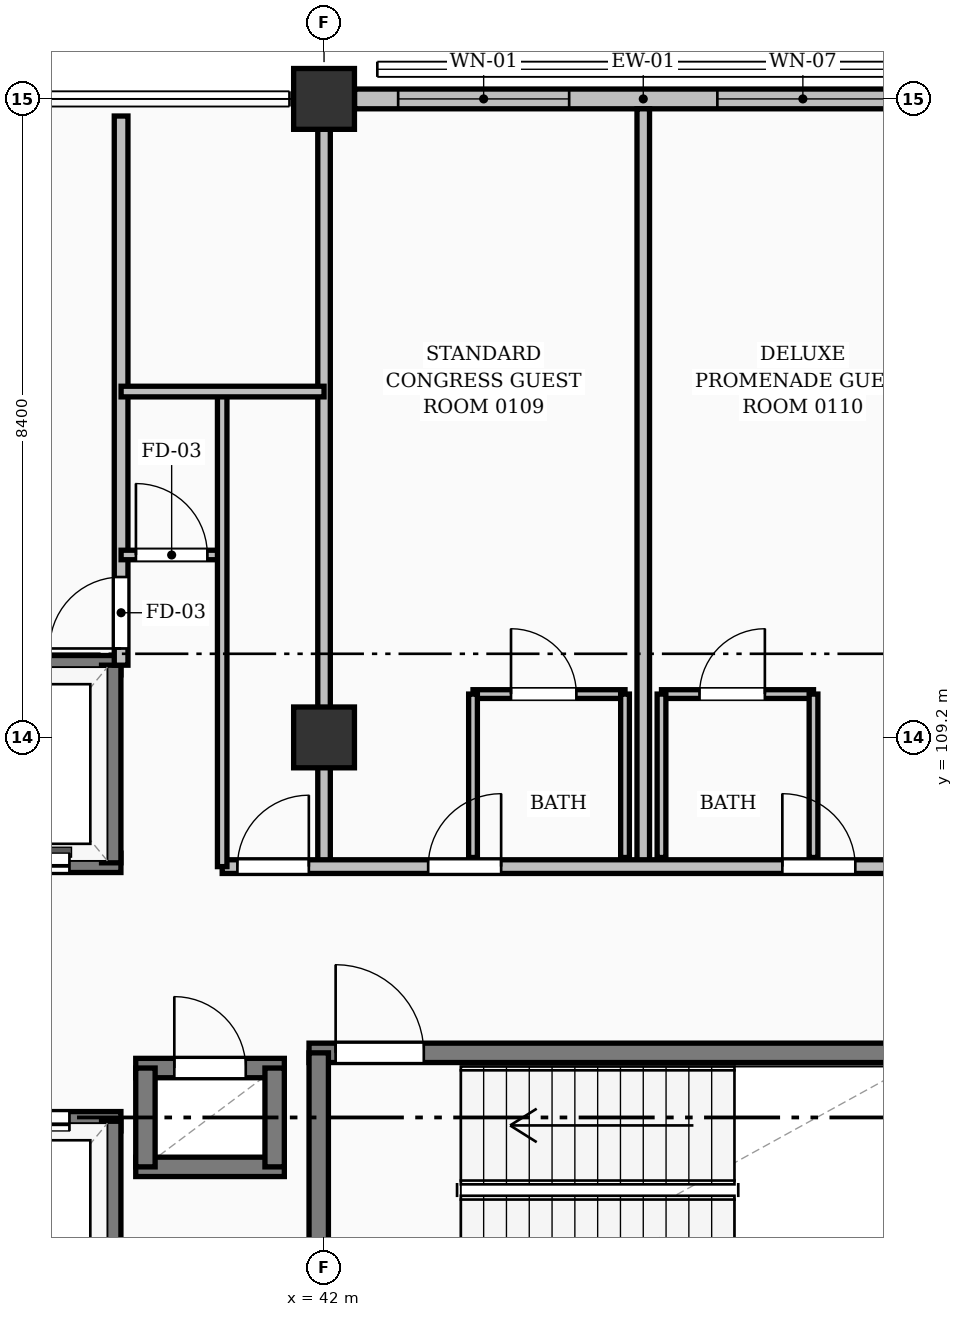
"""IFC4 building model, lengths in metres.
Left out: names, types, materials, properties, quantities, classifications, styles, units other than length and angle.
Written with IfcOpenShell. Run it as: python <this file> out.ifc"""

import sys

from ifc_helpers import new_model, si_unit, direction, frame, frame_2d, origin, origin_2d, place, context, subcontext, project, spatial, rectangle, extrude, element, fill, save


model = new_model("IFC4")
c1 = context("Model", 3, precision=1e-05, world=origin(), true_north=direction((0.0, 1.0)))
c2 = subcontext(c1, "Body", "Model", "MODEL_VIEW")
j1 = project(units=[si_unit("LENGTHUNIT", "METRE"), si_unit("PLANEANGLEUNIT", "RADIAN")], contexts=[c1])
p1 = place(None, origin())
s1 = spatial("IfcSite", under=j1, at=p1, CompositionType="ELEMENT")
p2 = place(p1, origin())
s2 = spatial("IfcBuilding", under=s1, at=p2, CompositionType="ELEMENT")
p3 = place(p2, frame((0.0, 0.0, 3.92)))
s3 = spatial("IfcBuildingStorey", under=s2, at=p3, CompositionType="ELEMENT", Elevation=3.92)
for number, where, z_axis, x_axis in (
    (1, (42.0, 109.2, 0.0), (0.0, 0.0, 1.0), (1.0, 0.0, 0.0)),
    (2, (42.0, 117.6, 0.0), (0.0, 0.0, 1.0), (1.0, 0.0, 0.0)),
):
    element("IfcColumn", number, at=place(p3, frame(where, z_axis=z_axis, x_axis=x_axis)), inside=s3, PredefinedType="COLUMN", context=c2, shape_type="SweptSolid", body=[
        extrude(rectangle(XDim=0.8, YDim=0.8, at=origin_2d()), origin(), (0.0, 0.0, 1.0), 3.64),
    ])
p4 = place(p3, frame((42.401, 117.6, 0.0), z_axis=(0.0, 0.0, 1.0), x_axis=(1.0, 0.0, 0.0)))
e3 = element("IfcWall", 3, at=p4, inside=s3, PredefinedType="SOLIDWALL", context=c2, shape_type="SweptSolid", body=[
    extrude(rectangle(XDim=7.598, YDim=0.26, at=frame_2d((3.799, 0.0))), origin(), (0.0, 0.0, 1.0), 2.445),
])
p5 = place(p4, frame((0.574, 0.0, 0.25)))
e4 = element("IfcOpeningElement", 4, at=p5, cuts=e3, PredefinedType="OPENING", context=c2, shape_type="SweptSolid", body=[
    extrude(rectangle(XDim=2.25, YDim=1.85, at=frame_2d((1.125, 0.925))), frame((0.0, 0.14, 0.0), z_axis=(0.0, -1.0, 0.0), x_axis=(1.0, 0.0, 0.0)), (0.0, 0.0, 1.0), 0.28),
])
p6 = place(p4, frame((4.774, 0.0, 0.25)))
e5 = element("IfcOpeningElement", 5, at=p6, cuts=e3, PredefinedType="OPENING", context=c2, shape_type="SweptSolid", body=[
    extrude(rectangle(XDim=2.25, YDim=1.95, at=frame_2d((1.125, 0.975))), frame((0.0, 0.14, 0.0), z_axis=(0.0, -1.0, 0.0), x_axis=(1.0, 0.0, 0.0)), (0.0, 0.0, 1.0), 0.28),
])
p7 = place(p3, frame((41.802, 105.05, 0.0), z_axis=(0.0, 0.0, 1.0), x_axis=(1.0, 0.0, 0.0)))
e6 = element("IfcWall", 6, at=p7, inside=s3, PredefinedType="SOLIDWALL", context=c2, shape_type="SweptSolid", body=[
    extrude(rectangle(XDim=8.225, YDim=0.255, at=frame_2d((4.113, 0.0))), origin(), (0.0, 0.0, 1.0), 3.36),
])
p8 = place(p7, frame((0.35, 0.0, 0.0)))
e7 = element("IfcOpeningElement", 7, at=p8, cuts=e6, PredefinedType="OPENING", context=c2, shape_type="SweptSolid", body=[
    extrude(rectangle(XDim=1.16, YDim=2.15, at=frame_2d((0.58, 1.075))), frame((0.0, 0.137, 0.0), z_axis=(0.0, -1.0, 0.0), x_axis=(1.0, 0.0, 0.0)), (0.0, 0.0, 1.0), 0.275),
])
p9 = place(p3, frame((41.93, 101.42, 0.0), z_axis=(0.0, 0.0, 1.0), x_axis=(0.0, 1.0, 0.0)))
e8 = element("IfcWall", 8, at=p9, inside=s3, PredefinedType="SOLIDWALL", context=c2, shape_type="SweptSolid", body=[
    extrude(rectangle(XDim=3.63, YDim=0.255, at=frame_2d((1.815, 0.0))), origin(), (0.0, 0.0, 1.0), 3.36),
])
p10 = place(p3, frame((36.873, 107.55, 0.0), z_axis=(0.0, 0.0, 1.0), x_axis=(1.0, 0.0, 0.0)))
e9 = element("IfcWall", 9, at=p10, inside=s3, PredefinedType="SOLIDWALL", context=c2, shape_type="SweptSolid", body=[
    extrude(rectangle(XDim=2.455, YDim=0.255, at=frame_2d((1.228, 0.0))), origin(), (0.0, 0.0, 1.0), 3.36),
])
p11 = place(p10, frame((0.677, 0.0, 0.0)))
e10 = element("IfcOpeningElement", 10, at=p11, cuts=e9, PredefinedType="OPENING", context=c2, shape_type="SweptSolid", body=[
    extrude(rectangle(XDim=1.1, YDim=2.15, at=frame_2d((0.55, 1.075))), frame((0.0, 0.137, 0.0), z_axis=(0.0, -1.0, 0.0), x_axis=(1.0, 0.0, 0.0)), (0.0, 0.0, 1.0), 0.275),
])
p12 = place(p3, frame((36.873, 110.15, 0.0), z_axis=(0.0, 0.0, 1.0), x_axis=(1.0, 0.0, 0.0)))
e11 = element("IfcWall", 11, at=p12, inside=s3, PredefinedType="SOLIDWALL", context=c2, shape_type="SweptSolid", body=[
    extrude(rectangle(XDim=2.455, YDim=0.255, at=frame_2d((1.228, 0.0))), origin(), (0.0, 0.0, 1.0), 3.36),
])
p13 = place(p3, frame((39.2, 107.55, 0.0), z_axis=(0.0, 0.0, 1.0), x_axis=(0.0, 1.0, 0.0)))
e12 = element("IfcWall", 12, at=p13, inside=s3, PredefinedType="SOLIDWALL", context=c2, shape_type="SweptSolid", body=[
    extrude(rectangle(XDim=2.6, YDim=0.255, at=frame_2d((1.3, 0.0))), origin(), (0.0, 0.0, 1.0), 3.36),
])
p14 = place(p3, frame((36.873, 104.15, 0.0), z_axis=(0.0, 0.0, 1.0), x_axis=(1.0, 0.0, 0.0)))
e13 = element("IfcWall", 13, at=p14, inside=s3, PredefinedType="SOLIDWALL", context=c2, shape_type="SweptSolid", body=[
    extrude(rectangle(XDim=2.455, YDim=0.255, at=frame_2d((1.228, 0.0))), origin(), (0.0, 0.0, 1.0), 3.36),
])
p15 = place(p14, frame((0.677, 0.0, 0.0)))
e14 = element("IfcOpeningElement", 14, at=p15, cuts=e13, PredefinedType="OPENING", context=c2, shape_type="SweptSolid", body=[
    extrude(rectangle(XDim=1.1, YDim=2.15, at=frame_2d((0.55, 1.075))), frame((0.0, 0.137, 0.0), z_axis=(0.0, -1.0, 0.0), x_axis=(1.0, 0.0, 0.0)), (0.0, 0.0, 1.0), 0.275),
])
p16 = place(p3, frame((39.2, 101.55, 0.0), z_axis=(0.0, 0.0, 1.0), x_axis=(0.0, 1.0, 0.0)))
e15 = element("IfcWall", 15, at=p16, inside=s3, PredefinedType="SOLIDWALL", context=c2, shape_type="SweptSolid", body=[
    extrude(rectangle(XDim=2.6, YDim=0.255, at=frame_2d((1.3, 0.0))), origin(), (0.0, 0.0, 1.0), 3.36),
])
p17 = place(p3, frame((39.522, 103.55, 0.0), z_axis=(0.0, 0.0, 1.0), x_axis=(1.0, 0.0, 0.0)))
e16 = element("IfcWall", 16, at=p17, inside=s3, PredefinedType="SOLIDWALL", context=c2, shape_type="SweptSolid", body=[
    extrude(rectangle(XDim=1.955, YDim=0.255, at=frame_2d((0.978, 0.0))), origin(), (0.0, 0.0, 1.0), 3.36),
])
p18 = place(p3, frame((39.522, 104.85, 0.0), z_axis=(0.0, 0.0, 1.0), x_axis=(1.0, 0.0, 0.0)))
e17 = element("IfcWall", 17, at=p18, inside=s3, PredefinedType="SOLIDWALL", context=c2, shape_type="SweptSolid", body=[
    extrude(rectangle(XDim=1.955, YDim=0.255, at=frame_2d((0.978, 0.0))), origin(), (0.0, 0.0, 1.0), 3.36),
])
p19 = place(p18, frame((0.508, 0.0, 0.0)))
e18 = element("IfcOpeningElement", 18, at=p19, cuts=e17, PredefinedType="OPENING", context=c2, shape_type="SweptSolid", body=[
    extrude(rectangle(XDim=0.94, YDim=2.1, at=frame_2d((0.47, 1.05))), frame((0.0, 0.137, 0.0), z_axis=(0.0, -1.0, 0.0), x_axis=(1.0, 0.0, 0.0)), (0.0, 0.0, 1.0), 0.275),
])
for number, where, z_axis, x_axis in (
    (19, (39.65, 103.55, 0.0), (0.0, 0.0, 1.0), (0.0, 1.0, 0.0)),
    (20, (41.35, 103.55, 0.0), (0.0, 0.0, 1.0), (0.0, 1.0, 0.0)),
):
    element("IfcWall", number, at=place(p3, frame(where, z_axis=z_axis, x_axis=x_axis)), inside=s3, PredefinedType="SOLIDWALL", context=c2, shape_type="SweptSolid", body=[
        extrude(rectangle(XDim=1.3, YDim=0.255, at=frame_2d((0.65, 0.0))), origin(), (0.0, 0.0, 1.0), 3.36),
    ])
p20 = place(p3, frame((43.96, 109.77, 0.0), z_axis=(0.0, 0.0, 1.0), x_axis=(1.0, 0.0, 0.0)))
e21 = element("IfcWall", 21, at=p20, inside=s3, PredefinedType="PARTITIONING", context=c2, shape_type="SweptSolid", body=[
    extrude(rectangle(XDim=2.0, YDim=0.115, at=frame_2d((1.0, 0.0))), origin(), (0.0, 0.0, 1.0), 3.36),
])
p21 = place(p20, frame((0.5, 0.0, 0.0)))
e22 = element("IfcOpeningElement", 22, at=p21, cuts=e21, PredefinedType="OPENING", context=c2, shape_type="SweptSolid", body=[
    extrude(rectangle(XDim=0.86, YDim=2.05, at=frame_2d((0.43, 1.025))), frame((0.0, 0.067, 0.0), z_axis=(0.0, -1.0, 0.0), x_axis=(1.0, 0.0, 0.0)), (0.0, 0.0, 1.0), 0.135),
])
p22 = place(p3, frame((43.96, 107.62, 0.0), z_axis=(0.0, 0.0, 1.0), x_axis=(0.0, 1.0, 0.0)))
e23 = element("IfcWall", 23, at=p22, inside=s3, PredefinedType="PARTITIONING", context=c2, shape_type="SweptSolid", body=[
    extrude(rectangle(XDim=2.15, YDim=0.115, at=frame_2d((1.075, 0.0))), origin(), (0.0, 0.0, 1.0), 2.882),
])
p23 = place(p3, frame((45.96, 107.62, 0.0), z_axis=(0.0, 0.0, 1.0), x_axis=(0.0, 1.0, 0.0)))
e24 = element("IfcWall", 24, at=p23, inside=s3, PredefinedType="PARTITIONING", context=c2, shape_type="SweptSolid", body=[
    extrude(rectangle(XDim=2.15, YDim=0.115, at=frame_2d((1.075, 0.0))), origin(), (0.0, 0.0, 1.0), 3.36),
])
p24 = place(p3, frame((46.44, 109.77, 0.0), z_axis=(0.0, 0.0, 1.0), x_axis=(1.0, 0.0, 0.0)))
e25 = element("IfcWall", 25, at=p24, inside=s3, PredefinedType="PARTITIONING", context=c2, shape_type="SweptSolid", body=[
    extrude(rectangle(XDim=2.0, YDim=0.115, at=frame_2d((1.0, 0.0))), origin(), (0.0, 0.0, 1.0), 3.36),
])
p25 = place(p24, frame((0.5, 0.0, 0.0)))
e26 = element("IfcOpeningElement", 26, at=p25, cuts=e25, PredefinedType="OPENING", context=c2, shape_type="SweptSolid", body=[
    extrude(rectangle(XDim=0.86, YDim=2.05, at=frame_2d((0.43, 1.025))), frame((0.0, 0.067, 0.0), z_axis=(0.0, -1.0, 0.0), x_axis=(1.0, 0.0, 0.0)), (0.0, 0.0, 1.0), 0.135),
])
p26 = place(p3, frame((46.44, 107.62, 0.0), z_axis=(0.0, 0.0, 1.0), x_axis=(0.0, 1.0, 0.0)))
e27 = element("IfcWall", 27, at=p26, inside=s3, PredefinedType="PARTITIONING", context=c2, shape_type="SweptSolid", body=[
    extrude(rectangle(XDim=2.15, YDim=0.115, at=frame_2d((1.075, 0.0))), origin(), (0.0, 0.0, 1.0), 3.36),
])
p27 = place(p3, frame((48.44, 107.62, 0.0), z_axis=(0.0, 0.0, 1.0), x_axis=(0.0, 1.0, 0.0)))
e28 = element("IfcWall", 28, at=p27, inside=s3, PredefinedType="PARTITIONING", context=c2, shape_type="SweptSolid", body=[
    extrude(rectangle(XDim=2.15, YDim=0.115, at=frame_2d((1.075, 0.0))), origin(), (0.0, 0.0, 1.0), 2.882),
])
p28 = place(p3, frame((46.2, 107.5, 0.0), z_axis=(0.0, 0.0, 1.0), x_axis=(0.0, 1.0, 0.0)))
e29 = element("IfcWall", 29, at=p28, inside=s3, PredefinedType="PARTITIONING", context=c2, shape_type="SweptSolid", body=[
    extrude(rectangle(XDim=9.97, YDim=0.165, at=frame_2d((4.985, 0.0))), origin(), (0.0, 0.0, 1.0), 3.36),
])
p29 = place(p3, frame((42.0, 107.5, 0.0), z_axis=(0.0, 0.0, 1.0), x_axis=(0.0, 1.0, 0.0)))
e30 = element("IfcWall", 30, at=p29, inside=s3, PredefinedType="PARTITIONING", context=c2, shape_type="SweptSolid", body=[
    extrude(rectangle(XDim=9.75, YDim=0.165, at=frame_2d((4.875, 0.0))), origin(), (0.0, 0.0, 1.0), 2.595),
])
p30 = place(p3, frame((40.66, 107.5, 0.0), z_axis=(0.0, 0.0, 1.0), x_axis=(1.0, 0.0, 0.0)))
e31 = element("IfcWall", 31, at=p30, inside=s3, PredefinedType="PARTITIONING", context=c2, shape_type="SweptSolid", body=[
    extrude(rectangle(XDim=43.15, YDim=0.18, at=frame_2d((21.575, 0.0))), origin(), (0.0, 0.0, 1.0), 3.36),
])
p31 = place(p30, frame((0.2, 0.0, 0.0)))
e32 = element("IfcOpeningElement", 32, at=p31, cuts=e31, PredefinedType="OPENING", context=c2, shape_type="SweptSolid", body=[
    extrude(rectangle(XDim=0.94, YDim=2.1, at=frame_2d((0.47, 1.05))), frame((0.0, 0.1, 0.0), z_axis=(0.0, -1.0, 0.0), x_axis=(1.0, 0.0, 0.0)), (0.0, 0.0, 1.0), 0.2),
])
p32 = place(p30, frame((2.71, 0.0, 0.0)))
e33 = element("IfcOpeningElement", 33, at=p32, cuts=e31, PredefinedType="OPENING", context=c2, shape_type="SweptSolid", body=[
    extrude(rectangle(XDim=0.96, YDim=2.15, at=frame_2d((0.48, 1.075))), frame((0.0, 0.1, 0.0), z_axis=(0.0, -1.0, 0.0), x_axis=(1.0, 0.0, 0.0)), (0.0, 0.0, 1.0), 0.2),
])
p33 = place(p30, frame((7.37, 0.0, 0.0)))
e34 = element("IfcOpeningElement", 34, at=p33, cuts=e31, PredefinedType="OPENING", context=c2, shape_type="SweptSolid", body=[
    extrude(rectangle(XDim=0.96, YDim=2.15, at=frame_2d((0.48, 1.075))), frame((0.0, 0.1, 0.0), z_axis=(0.0, -1.0, 0.0), x_axis=(1.0, 0.0, 0.0)), (0.0, 0.0, 1.0), 0.2),
])
p34 = place(p30, frame((11.11, 0.0, 0.0)))
e35 = element("IfcOpeningElement", 35, at=p34, cuts=e31, PredefinedType="OPENING", context=c2, shape_type="SweptSolid", body=[
    extrude(rectangle(XDim=0.96, YDim=2.15, at=frame_2d((0.48, 1.075))), frame((0.0, 0.1, 0.0), z_axis=(0.0, -1.0, 0.0), x_axis=(1.0, 0.0, 0.0)), (0.0, 0.0, 1.0), 0.2),
])
p35 = place(p30, frame((15.77, 0.0, 0.0)))
e36 = element("IfcOpeningElement", 36, at=p35, cuts=e31, PredefinedType="OPENING", context=c2, shape_type="SweptSolid", body=[
    extrude(rectangle(XDim=0.96, YDim=2.15, at=frame_2d((0.48, 1.075))), frame((0.0, 0.1, 0.0), z_axis=(0.0, -1.0, 0.0), x_axis=(1.0, 0.0, 0.0)), (0.0, 0.0, 1.0), 0.2),
])
p36 = place(p30, frame((19.51, 0.0, 0.0)))
e37 = element("IfcOpeningElement", 37, at=p36, cuts=e31, PredefinedType="OPENING", context=c2, shape_type="SweptSolid", body=[
    extrude(rectangle(XDim=0.96, YDim=2.15, at=frame_2d((0.48, 1.075))), frame((0.0, 0.1, 0.0), z_axis=(0.0, -1.0, 0.0), x_axis=(1.0, 0.0, 0.0)), (0.0, 0.0, 1.0), 0.2),
])
p37 = place(p30, frame((24.17, 0.0, 0.0)))
e38 = element("IfcOpeningElement", 38, at=p37, cuts=e31, PredefinedType="OPENING", context=c2, shape_type="SweptSolid", body=[
    extrude(rectangle(XDim=0.96, YDim=2.15, at=frame_2d((0.48, 1.075))), frame((0.0, 0.1, 0.0), z_axis=(0.0, -1.0, 0.0), x_axis=(1.0, 0.0, 0.0)), (0.0, 0.0, 1.0), 0.2),
])
p38 = place(p30, frame((27.91, 0.0, 0.0)))
e39 = element("IfcOpeningElement", 39, at=p38, cuts=e31, PredefinedType="OPENING", context=c2, shape_type="SweptSolid", body=[
    extrude(rectangle(XDim=0.96, YDim=2.15, at=frame_2d((0.48, 1.075))), frame((0.0, 0.1, 0.0), z_axis=(0.0, -1.0, 0.0), x_axis=(1.0, 0.0, 0.0)), (0.0, 0.0, 1.0), 0.2),
])
p39 = place(p30, frame((32.57, 0.0, 0.0)))
e40 = element("IfcOpeningElement", 40, at=p39, cuts=e31, PredefinedType="OPENING", context=c2, shape_type="SweptSolid", body=[
    extrude(rectangle(XDim=0.96, YDim=2.15, at=frame_2d((0.48, 1.075))), frame((0.0, 0.1, 0.0), z_axis=(0.0, -1.0, 0.0), x_axis=(1.0, 0.0, 0.0)), (0.0, 0.0, 1.0), 0.2),
])
p40 = place(p30, frame((36.31, 0.0, 0.0)))
e41 = element("IfcOpeningElement", 41, at=p40, cuts=e31, PredefinedType="OPENING", context=c2, shape_type="SweptSolid", body=[
    extrude(rectangle(XDim=0.96, YDim=2.15, at=frame_2d((0.48, 1.075))), frame((0.0, 0.1, 0.0), z_axis=(0.0, -1.0, 0.0), x_axis=(1.0, 0.0, 0.0)), (0.0, 0.0, 1.0), 0.2),
])
p41 = place(p30, frame((40.97, 0.0, 0.0)))
e42 = element("IfcOpeningElement", 42, at=p41, cuts=e31, PredefinedType="OPENING", context=c2, shape_type="SweptSolid", body=[
    extrude(rectangle(XDim=0.96, YDim=2.15, at=frame_2d((0.48, 1.075))), frame((0.0, 0.1, 0.0), z_axis=(0.0, -1.0, 0.0), x_axis=(1.0, 0.0, 0.0)), (0.0, 0.0, 1.0), 0.2),
])
p42 = place(p3, frame((39.33, 110.15, 0.0), z_axis=(0.0, 0.0, 1.0), x_axis=(0.0, 1.0, 0.0)))
e43 = element("IfcWall", 43, at=p42, inside=s3, PredefinedType="PARTITIONING", context=c2, shape_type="SweptSolid", body=[
    extrude(rectangle(XDim=7.225, YDim=0.18, at=frame_2d((3.613, 0.0))), origin(), (0.0, 0.0, 1.0), 3.36),
])
p43 = place(p42, frame((0.22, 0.0, 0.0)))
e44 = element("IfcOpeningElement", 44, at=p43, cuts=e43, PredefinedType="OPENING", context=c2, shape_type="SweptSolid", body=[
    extrude(rectangle(XDim=0.94, YDim=2.1, at=frame_2d((0.47, 1.05))), frame((0.0, 0.1, 0.0), z_axis=(0.0, -1.0, 0.0), x_axis=(1.0, 0.0, 0.0)), (0.0, 0.0, 1.0), 0.2),
])
p44 = place(p3, frame((39.33, 111.6, 0.0), z_axis=(0.0, 0.0, 1.0), x_axis=(1.0, 0.0, 0.0)))
e45 = element("IfcWall", 45, at=p44, inside=s3, PredefinedType="PARTITIONING", context=c2, shape_type="SweptSolid", body=[
    extrude(rectangle(XDim=1.33, YDim=0.125, at=frame_2d((0.665, 0.0))), origin(), (0.0, 0.0, 1.0), 3.36),
])
p45 = place(p44, frame((0.195, 0.0, 0.0)))
e46 = element("IfcOpeningElement", 46, at=p45, cuts=e45, PredefinedType="OPENING", context=c2, shape_type="SweptSolid", body=[
    extrude(rectangle(XDim=0.94, YDim=2.1, at=frame_2d((0.47, 1.05))), frame((0.0, 0.073, 0.0), z_axis=(0.0, -1.0, 0.0), x_axis=(1.0, 0.0, 0.0)), (0.0, 0.0, 1.0), 0.145),
])
p46 = place(p3, frame((40.66, 107.5, 0.0), z_axis=(0.0, 0.0, 1.0), x_axis=(0.0, 1.0, 0.0)))
e47 = element("IfcWall", 47, at=p46, inside=s3, PredefinedType="PARTITIONING", context=c2, shape_type="SweptSolid", body=[
    extrude(rectangle(XDim=6.25, YDim=0.125, at=frame_2d((3.125, 0.0))), origin(), (0.0, 0.0, 1.0), 3.36),
])
p47 = place(p3, frame((39.33, 113.75, 0.0), z_axis=(0.0, 0.0, 1.0), x_axis=(1.0, 0.0, 0.0)))
e48 = element("IfcWall", 48, at=p47, inside=s3, PredefinedType="PARTITIONING", context=c2, shape_type="SweptSolid", body=[
    extrude(rectangle(XDim=2.67, YDim=0.14, at=frame_2d((1.335, 0.0))), origin(), (0.0, 0.0, 1.0), 3.36),
])
p48 = place(p5, origin())
e49 = element("IfcWindow", 49, at=p48, inside=s3, PartitioningType="DOUBLE_PANEL_VERTICAL", PredefinedType="WINDOW", context=c2, shape_type="SweptSolid", body=[
    extrude(rectangle(XDim=2.25, YDim=1.85, at=frame_2d((1.125, 0.925))), frame((0.0, 0.03, 0.0), z_axis=(0.0, -1.0, 0.0), x_axis=(1.0, 0.0, 0.0)), (0.0, 0.0, 1.0), 0.06),
])
fill(e4, e49)
p49 = place(p6, origin())
e50 = element("IfcWindow", 50, at=p49, inside=s3, PartitioningType="DOUBLE_PANEL_VERTICAL", PredefinedType="WINDOW", context=c2, shape_type="SweptSolid", body=[
    extrude(rectangle(XDim=2.25, YDim=1.95, at=frame_2d((1.125, 0.975))), frame((0.0, 0.03, 0.0), z_axis=(0.0, -1.0, 0.0), x_axis=(1.0, 0.0, 0.0)), (0.0, 0.0, 1.0), 0.06),
])
fill(e5, e50)
p50 = place(p8, origin())
e51 = element("IfcDoor", 51, at=p50, inside=s3, OperationType="SINGLE_SWING_LEFT", PredefinedType="DOOR", context=c2, shape_type="SweptSolid", body=[
    extrude(rectangle(XDim=1.16, YDim=2.15, at=frame_2d((0.58, 1.075))), frame((0.0, 0.025, 0.0), z_axis=(0.0, -1.0, 0.0), x_axis=(1.0, 0.0, 0.0)), (0.0, 0.0, 1.0), 0.05),
])
fill(e7, e51)
p51 = place(p11, origin())
e52 = element("IfcDoor", 52, at=p51, inside=s3, OperationType="DOUBLE_DOOR_SLIDING", PredefinedType="DOOR", context=c2, shape_type="SweptSolid", body=[
    extrude(rectangle(XDim=1.1, YDim=2.15, at=frame_2d((0.55, 1.075))), frame((0.0, 0.025, 0.0), z_axis=(0.0, -1.0, 0.0), x_axis=(1.0, 0.0, 0.0)), (0.0, 0.0, 1.0), 0.05),
])
fill(e10, e52)
p52 = place(p15, origin())
e53 = element("IfcDoor", 53, at=p52, inside=s3, OperationType="DOUBLE_DOOR_SLIDING", PredefinedType="DOOR", context=c2, shape_type="SweptSolid", body=[
    extrude(rectangle(XDim=1.1, YDim=2.15, at=frame_2d((0.55, 1.075))), frame((0.0, 0.025, 0.0), z_axis=(0.0, -1.0, 0.0), x_axis=(1.0, 0.0, 0.0)), (0.0, 0.0, 1.0), 0.05),
])
fill(e14, e53)
p53 = place(p19, origin())
e54 = element("IfcDoor", 54, at=p53, inside=s3, OperationType="SINGLE_SWING_LEFT", PredefinedType="DOOR", context=c2, shape_type="SweptSolid", body=[
    extrude(rectangle(XDim=0.94, YDim=2.1, at=frame_2d((0.47, 1.05))), frame((0.0, 0.025, 0.0), z_axis=(0.0, -1.0, 0.0), x_axis=(1.0, 0.0, 0.0)), (0.0, 0.0, 1.0), 0.05),
])
fill(e18, e54)
p54 = place(p21, origin())
e55 = element("IfcDoor", 55, at=p54, inside=s3, OperationType="SINGLE_SWING_LEFT", PredefinedType="DOOR", context=c2, shape_type="SweptSolid", body=[
    extrude(rectangle(XDim=0.86, YDim=2.05, at=frame_2d((0.43, 1.025))), frame((0.0, 0.025, 0.0), z_axis=(0.0, -1.0, 0.0), x_axis=(1.0, 0.0, 0.0)), (0.0, 0.0, 1.0), 0.05),
])
fill(e22, e55)
p55 = place(p25, origin())
e56 = element("IfcDoor", 56, at=p55, inside=s3, OperationType="SINGLE_SWING_RIGHT", PredefinedType="DOOR", context=c2, shape_type="SweptSolid", body=[
    extrude(rectangle(XDim=0.86, YDim=2.05, at=frame_2d((0.43, 1.025))), frame((0.0, 0.025, 0.0), z_axis=(0.0, -1.0, 0.0), x_axis=(1.0, 0.0, 0.0)), (0.0, 0.0, 1.0), 0.05),
])
fill(e26, e56)
p56 = place(p31, origin())
e57 = element("IfcDoor", 57, at=p56, inside=s3, OperationType="SINGLE_SWING_RIGHT", PredefinedType="DOOR", context=c2, shape_type="SweptSolid", body=[
    extrude(rectangle(XDim=0.94, YDim=2.1, at=frame_2d((0.47, 1.05))), frame((0.0, 0.025, 0.0), z_axis=(0.0, -1.0, 0.0), x_axis=(1.0, 0.0, 0.0)), (0.0, 0.0, 1.0), 0.05),
])
fill(e32, e57)
p57 = place(p32, origin())
e58 = element("IfcDoor", 58, at=p57, inside=s3, OperationType="SINGLE_SWING_RIGHT", PredefinedType="DOOR", context=c2, shape_type="SweptSolid", body=[
    extrude(rectangle(XDim=0.96, YDim=2.15, at=frame_2d((0.48, 1.075))), frame((0.0, 0.025, 0.0), z_axis=(0.0, -1.0, 0.0), x_axis=(1.0, 0.0, 0.0)), (0.0, 0.0, 1.0), 0.05),
])
fill(e33, e58)
p58 = place(p33, origin())
e59 = element("IfcDoor", 59, at=p58, inside=s3, OperationType="SINGLE_SWING_LEFT", PredefinedType="DOOR", context=c2, shape_type="SweptSolid", body=[
    extrude(rectangle(XDim=0.96, YDim=2.15, at=frame_2d((0.48, 1.075))), frame((0.0, 0.025, 0.0), z_axis=(0.0, -1.0, 0.0), x_axis=(1.0, 0.0, 0.0)), (0.0, 0.0, 1.0), 0.05),
])
fill(e34, e59)
p59 = place(p43, origin())
e60 = element("IfcDoor", 60, at=p59, inside=s3, OperationType="SINGLE_SWING_LEFT", PredefinedType="DOOR", context=c2, shape_type="SweptSolid", body=[
    extrude(rectangle(XDim=0.94, YDim=2.1, at=frame_2d((0.47, 1.05))), frame((0.0, 0.025, 0.0), z_axis=(0.0, -1.0, 0.0), x_axis=(1.0, 0.0, 0.0)), (0.0, 0.0, 1.0), 0.05),
])
fill(e44, e60)
p60 = place(p45, origin())
e61 = element("IfcDoor", 61, at=p60, inside=s3, OperationType="SINGLE_SWING_LEFT", PredefinedType="DOOR", context=c2, shape_type="SweptSolid", body=[
    extrude(rectangle(XDim=0.94, YDim=2.1, at=frame_2d((0.47, 1.05))), frame((0.0, 0.025, 0.0), z_axis=(0.0, -1.0, 0.0), x_axis=(1.0, 0.0, 0.0)), (0.0, 0.0, 1.0), 0.05),
])
fill(e46, e61)
save(model, sys.argv[1])
